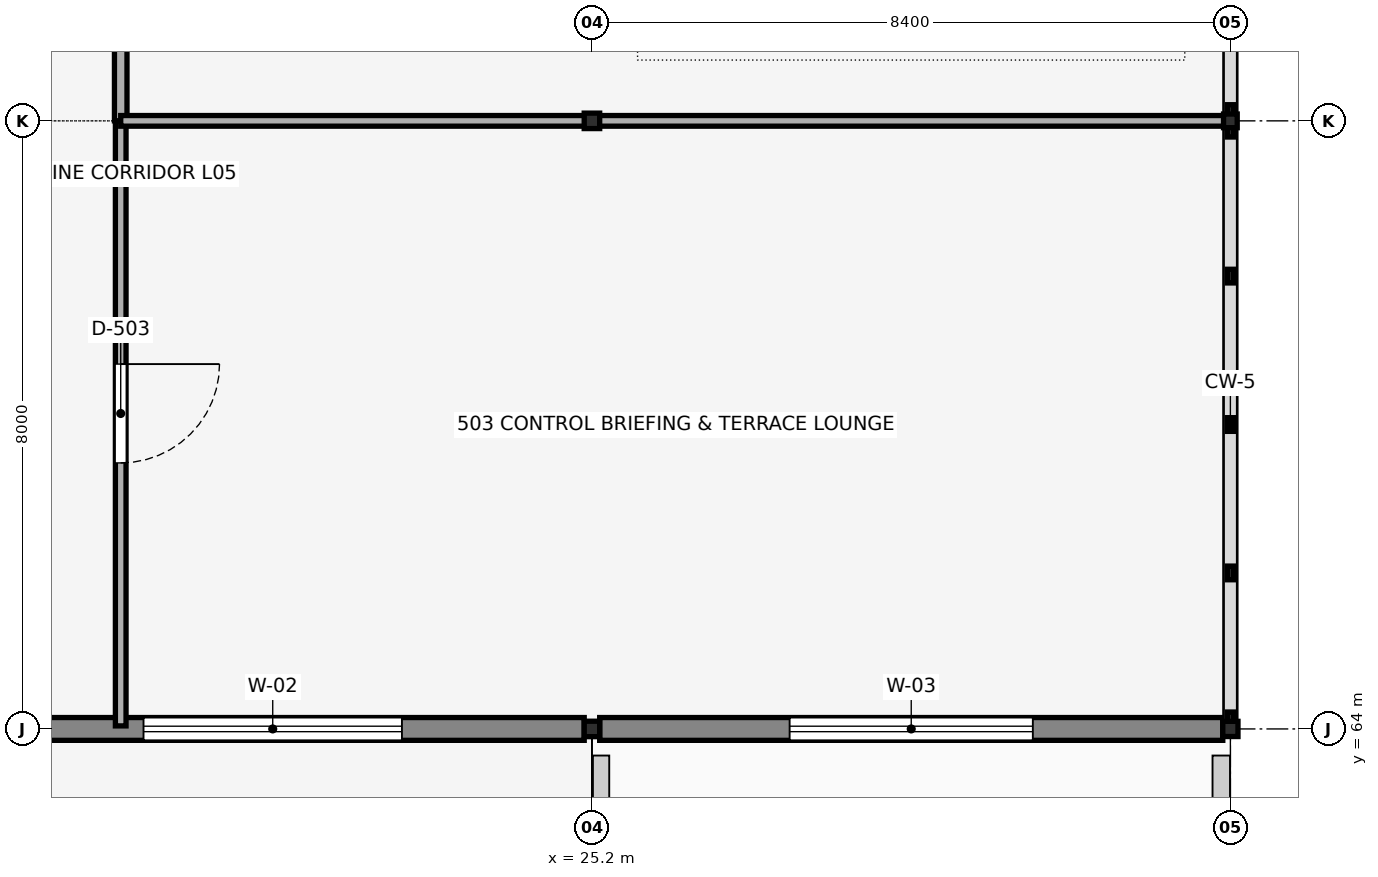
"""IFC4 building model, lengths in metres.
Left out: names, types, materials, properties, quantities, classifications, styles, units other than length and angle.
Written with IfcOpenShell. Run it as: python <this file> out.ifc"""

import sys

from ifc_helpers import new_model, si_unit, direction, frame, frame_2d, origin, origin_2d, place, context, subcontext, project, spatial, rectangle, hollow_rectangle, i_section, extrude, element, fill, save


model = new_model("IFC4")
c1 = context("Model", 3, precision=1e-05, world=origin(), true_north=direction((0.0, 1.0)))
c2 = subcontext(c1, "Body", "Model", "MODEL_VIEW")
j1 = project(units=[si_unit("LENGTHUNIT", "METRE"), si_unit("PLANEANGLEUNIT", "RADIAN")], contexts=[c1])
p1 = place(None, origin())
s1 = spatial("IfcSite", under=j1, at=p1, CompositionType="ELEMENT")
p2 = place(p1, origin())
s2 = spatial("IfcBuilding", under=s1, at=p2, CompositionType="ELEMENT")
p3 = place(p2, frame((0.0, 0.0, 21.04)))
s3 = spatial("IfcBuildingStorey", under=s2, at=p3, CompositionType="ELEMENT", Elevation=21.04)
for number, where, z_axis, x_axis in (
    (1, (25.2, 64.0, 0.0), (0.0, 0.0, 1.0), (1.0, 0.0, 0.0)),
    (2, (25.2, 72.0, 0.0), (0.0, 0.0, 1.0), (1.0, 0.0, 0.0)),
):
    element("IfcColumn", number, at=place(p3, frame(where, z_axis=z_axis, x_axis=x_axis)), inside=s3, PredefinedType="COLUMN", context=c2, shape_type="SweptSolid", body=[
        extrude(i_section(OverallWidth=0.204, OverallDepth=0.203, WebThickness=0.007, FlangeThickness=0.011, FilletRadius=0.01, at=origin_2d()), origin(), (0.0, 0.0, 1.0), 4.82),
    ])
p4 = place(p3, frame((33.6, 64.0, 0.0), z_axis=(0.0, 0.0, 1.0), x_axis=(1.0, 0.0, 0.0)))
e3 = element("IfcColumn", 3, at=p4, inside=s3, PredefinedType="COLUMN", context=c2, shape_type="SweptSolid", body=[
    extrude(hollow_rectangle(XDim=0.2, YDim=0.2, WallThickness=0.01, InnerFilletRadius=0.015, OuterFilletRadius=0.025, at=origin_2d()), origin(), (0.0, 0.0, 1.0), 3.92),
])
p5 = place(p3, frame((33.6, 72.0, 0.0), z_axis=(0.0, 0.0, 1.0), x_axis=(1.0, 0.0, 0.0)))
e4 = element("IfcColumn", 4, at=p5, inside=s3, PredefinedType="COLUMN", context=c2, shape_type="SweptSolid", body=[
    extrude(hollow_rectangle(XDim=0.18, YDim=0.18, WallThickness=0.008, InnerFilletRadius=0.012, OuterFilletRadius=0.02, at=origin_2d()), origin(), (0.0, 0.0, 1.0), 3.92),
])
p6 = place(p3, frame((16.902, 64.0, 0.0), z_axis=(0.0, 0.0, 1.0), x_axis=(1.0, 0.0, 0.0)))
e5 = element("IfcWall", 5, at=p6, inside=s3, PredefinedType="SOLIDWALL", context=c2, shape_type="SweptSolid", body=[
    extrude(rectangle(XDim=8.196, YDim=0.3, at=frame_2d((4.098, 0.0))), origin(), (0.0, 0.0, 1.0), 3.92),
])
p7 = place(p6, frame((2.398, 0.0, 0.9), z_axis=(0.0, 0.0, 1.0), x_axis=(1.0, 0.0, 0.0)))
e6 = element("IfcOpeningElement", 6, at=p7, cuts=e5, PredefinedType="OPENING", context=c2, shape_type="SweptSolid", body=[
    extrude(rectangle(XDim=3.4, YDim=1.7, at=frame_2d((1.7, 0.85))), frame((0.0, 0.16, 0.0), z_axis=(0.0, -1.0, 0.0), x_axis=(1.0, 0.0, 0.0)), (0.0, 0.0, 1.0), 0.32),
])
p8 = place(p3, frame((25.302, 64.0, 0.0), z_axis=(0.0, 0.0, 1.0), x_axis=(1.0, 0.0, 0.0)))
e7 = element("IfcWall", 7, at=p8, inside=s3, PredefinedType="SOLIDWALL", context=c2, shape_type="SweptSolid", body=[
    extrude(rectangle(XDim=8.198, YDim=0.3, at=frame_2d((4.099, 0.0))), origin(), (0.0, 0.0, 1.0), 3.92),
])
p9 = place(p8, frame((2.499, 0.0, 0.9), z_axis=(0.0, 0.0, 1.0), x_axis=(1.0, 0.0, 0.0)))
e8 = element("IfcOpeningElement", 8, at=p9, cuts=e7, PredefinedType="OPENING", context=c2, shape_type="SweptSolid", body=[
    extrude(rectangle(XDim=3.2, YDim=1.65, at=frame_2d((1.6, 0.825))), frame((0.0, 0.16, 0.0), z_axis=(0.0, -1.0, 0.0), x_axis=(1.0, 0.0, 0.0)), (0.0, 0.0, 1.0), 0.32),
])
p10 = place(p3, frame((25.32, 56.12, 0.0), z_axis=(0.0, 0.0, 1.0), x_axis=(0.0, 1.0, 0.0)))
e9 = element("IfcWall", 9, at=p10, inside=s3, PredefinedType="PARAPET", context=c2, shape_type="SweptSolid", body=[
    extrude(rectangle(XDim=7.53, YDim=0.215, at=frame_2d((3.765, 0.0))), origin(), (0.0, 0.0, 1.0), 1.05),
])
p11 = place(p3, frame((33.48, 63.65, 0.0), z_axis=(0.0, 0.0, 1.0), x_axis=(0.0, -1.0, 0.0)))
e10 = element("IfcWall", 10, at=p11, inside=s3, PredefinedType="PARAPET", context=c2, shape_type="SweptSolid", body=[
    extrude(rectangle(XDim=7.53, YDim=0.23, at=frame_2d((3.765, 0.0))), origin(), (0.0, 0.0, 1.0), 1.05),
])
p12 = place(p3, frame((19.0, 64.04, 0.0), z_axis=(0.0, 0.0, 1.0), x_axis=(0.0, 1.0, 0.0)))
e11 = element("IfcWall", 11, at=p12, inside=s3, PredefinedType="PARTITIONING", context=c2, shape_type="SweptSolid", body=[
    extrude(rectangle(XDim=7.96, YDim=0.14, at=frame_2d((3.98, 0.0))), origin(), (0.0, 0.0, 1.0), 3.92),
])
p13 = place(p12, frame((4.76, 0.0, 0.0), z_axis=(0.0, 0.0, 1.0), x_axis=(-1.0, 0.0, 0.0)))
e12 = element("IfcOpeningElement", 12, at=p13, cuts=e11, PredefinedType="OPENING", context=c2, shape_type="SweptSolid", body=[
    extrude(rectangle(XDim=1.3, YDim=2.25, at=frame_2d((0.65, 1.125))), frame((0.0, 0.08, 0.0), z_axis=(0.0, -1.0, 0.0), x_axis=(1.0, 0.0, 0.0)), (0.0, 0.0, 1.0), 0.16),
])
p14 = place(p3, frame((19.0, 72.0, 0.0), z_axis=(0.0, 0.0, 1.0), x_axis=(0.0, 1.0, 0.0)))
e13 = element("IfcWall", 13, at=p14, inside=s3, PredefinedType="PARTITIONING", context=c2, shape_type="SweptSolid", body=[
    extrude(rectangle(XDim=16.0, YDim=0.165, at=frame_2d((8.0, 0.0))), origin(), (0.0, 0.0, 1.0), 3.92),
])
p15 = place(p14, frame((4.68, 0.0, 0.0), z_axis=(0.0, 0.0, 1.0), x_axis=(-1.0, 0.0, 0.0)))
e14 = element("IfcOpeningElement", 14, at=p15, cuts=e13, PredefinedType="OPENING", context=c2, shape_type="SweptSolid", body=[
    extrude(rectangle(XDim=1.18, YDim=2.22, at=frame_2d((0.59, 1.11))), frame((0.0, 0.093, 0.0), z_axis=(0.0, -1.0, 0.0), x_axis=(1.0, 0.0, 0.0)), (0.0, 0.0, 1.0), 0.185),
])
p16 = place(p3, frame((19.0, 72.0, 0.0), z_axis=(0.0, 0.0, 1.0), x_axis=(1.0, 0.0, 0.0)))
e15 = element("IfcWall", 15, at=p16, inside=s3, PredefinedType="PARTITIONING", context=c2, shape_type="SweptSolid", body=[
    extrude(rectangle(XDim=6.108, YDim=0.14, at=frame_2d((3.054, 0.0))), origin(), (0.0, 0.0, 1.0), 3.92),
])
p17 = place(p3, frame((25.292, 72.0, 0.0), z_axis=(0.0, 0.0, 1.0), x_axis=(1.0, 0.0, 0.0)))
e16 = element("IfcWall", 16, at=p17, inside=s3, PredefinedType="PARTITIONING", context=c2, shape_type="SweptSolid", body=[
    extrude(rectangle(XDim=8.228, YDim=0.14, at=frame_2d((4.114, 0.0))), origin(), (0.0, 0.0, 1.0), 3.92),
])
p18 = place(p7, origin())
e17 = element("IfcWindow", 17, at=p18, inside=s3, PartitioningType="TRIPLE_PANEL_VERTICAL", PredefinedType="WINDOW", context=c2, shape_type="SweptSolid", body=[
    extrude(rectangle(XDim=3.4, YDim=1.7, at=frame_2d((1.7, 0.85))), frame((0.0, 0.03, 0.0), z_axis=(0.0, -1.0, 0.0), x_axis=(1.0, 0.0, 0.0)), (0.0, 0.0, 1.0), 0.06),
])
fill(e6, e17)
p19 = place(p9, origin())
e18 = element("IfcWindow", 18, at=p19, inside=s3, PartitioningType="TRIPLE_PANEL_VERTICAL", PredefinedType="WINDOW", context=c2, shape_type="SweptSolid", body=[
    extrude(rectangle(XDim=3.2, YDim=1.65, at=frame_2d((1.6, 0.825))), frame((0.0, 0.03, 0.0), z_axis=(0.0, -1.0, 0.0), x_axis=(1.0, 0.0, 0.0)), (0.0, 0.0, 1.0), 0.06),
])
fill(e8, e18)
p20 = place(p13, origin())
e19 = element("IfcDoor", 19, at=p20, inside=s3, OperationType="SINGLE_SWING_LEFT", PredefinedType="DOOR", context=c2, shape_type="SweptSolid", body=[
    extrude(rectangle(XDim=1.3, YDim=2.25, at=frame_2d((0.65, 1.125))), frame((0.0, 0.025, 0.0), z_axis=(0.0, -1.0, 0.0), x_axis=(1.0, 0.0, 0.0)), (0.0, 0.0, 1.0), 0.05),
])
fill(e12, e19)
save(model, sys.argv[1])
